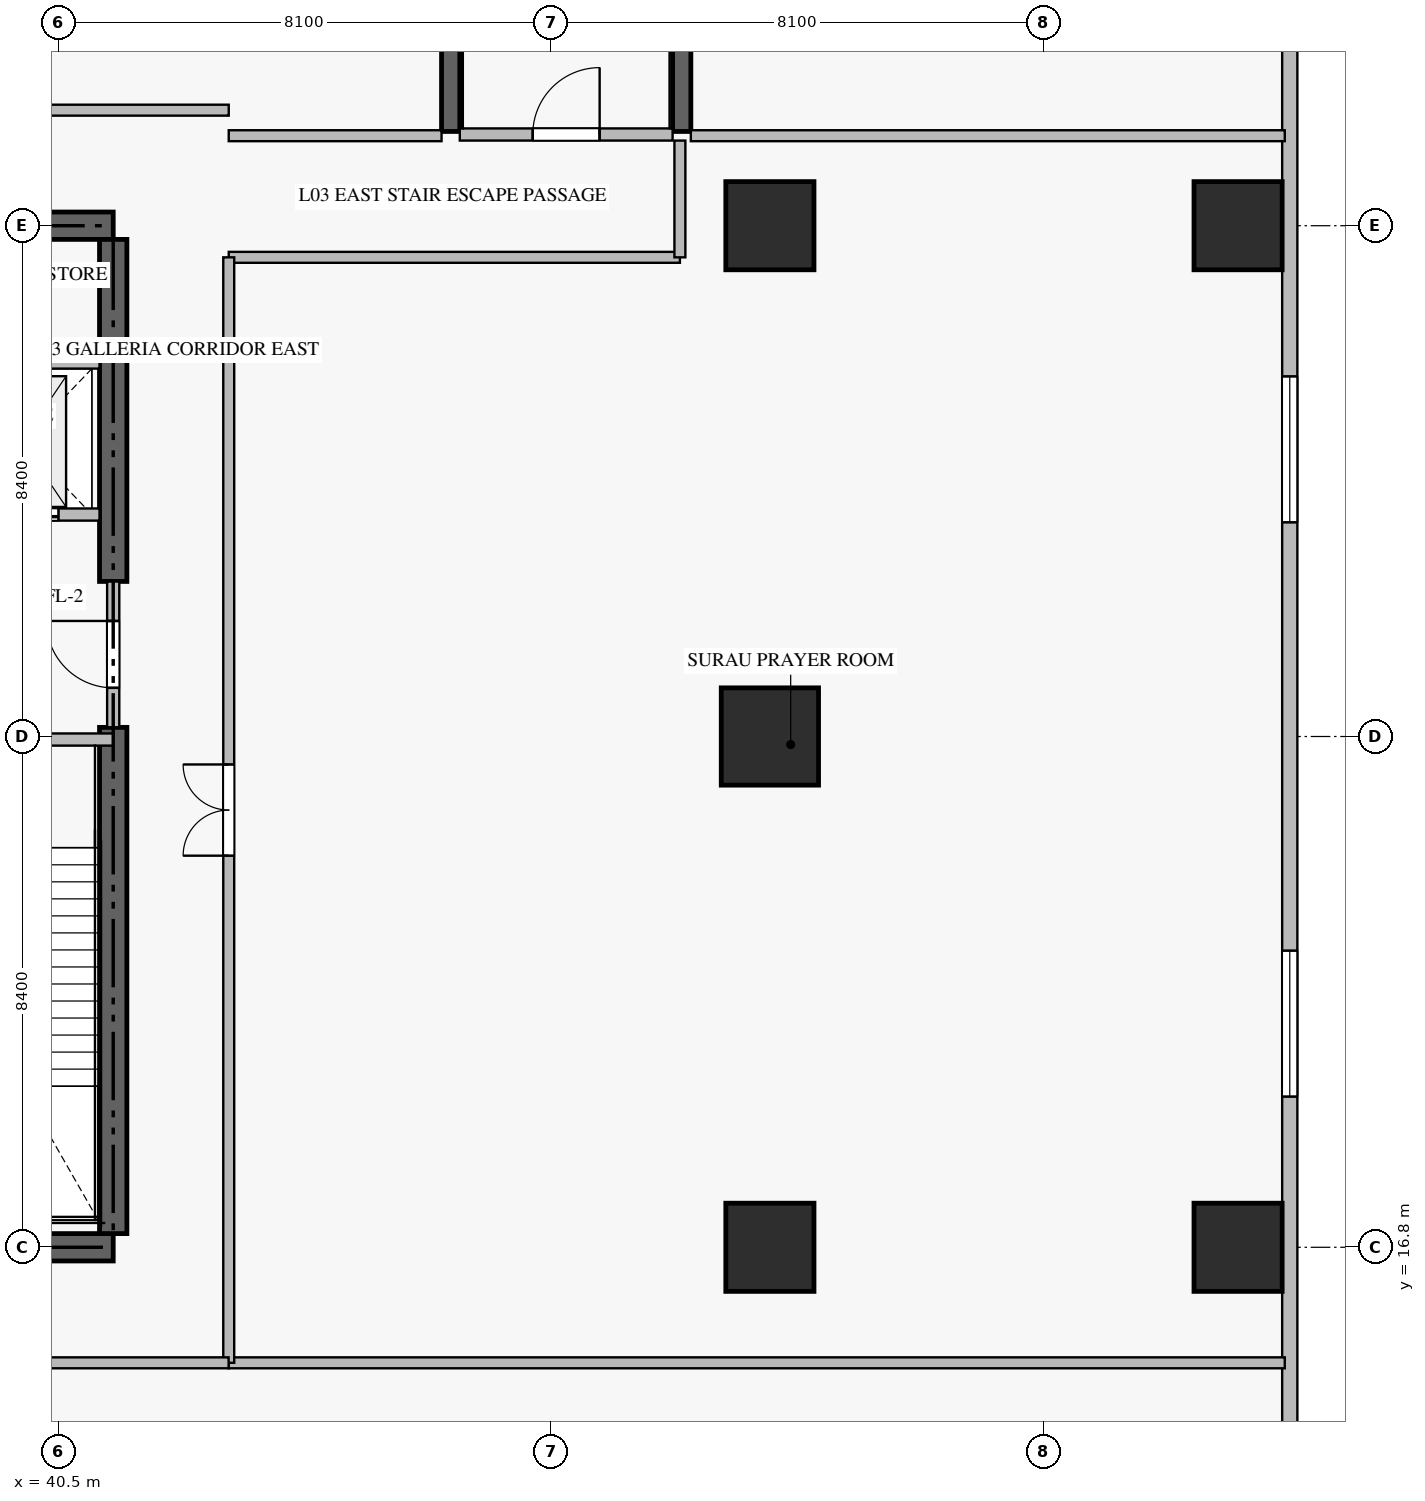
"""IFC4 building model, lengths in metres.
Left out: names, types, materials, properties, quantities, classifications, styles, units other than length and angle.
Written with IfcOpenShell. Run it as: python <this file> out.ifc"""

import sys

from ifc_helpers import new_model, si_unit, direction, frame, frame_2d, origin, origin_2d, place, context, subcontext, project, spatial, rectangle, extrude, source, transform, mapped, element, fill, save


model = new_model("IFC4")
c1 = context("Model", 3, precision=1e-05, world=origin(), true_north=direction((0.0, 1.0)))
c2 = subcontext(c1, "Body", "Model", "MODEL_VIEW")
j1 = project(units=[si_unit("LENGTHUNIT", "METRE"), si_unit("PLANEANGLEUNIT", "RADIAN")], contexts=[c1])
p1 = place(None, origin())
s1 = spatial("IfcSite", under=j1, at=p1, CompositionType="ELEMENT")
p2 = place(p1, origin())
s2 = spatial("IfcBuilding", under=s1, at=p2, CompositionType="ELEMENT")
p3 = place(p2, frame((0.0, 0.0, 15.3)))
s3 = spatial("IfcBuildingStorey", under=s2, at=p3, CompositionType="ELEMENT", Elevation=15.3)
for number, where, z_axis, x_axis in (
    (1, (23.4, 16.8, -0.38), (0.0, 0.0, 1.0), (1.0, 0.0, 0.0)),
    (2, (41.4, 33.6, -0.38), (0.0, 0.0, 1.0), (-1.0, 0.0, 0.0)),
):
    element("IfcWall", number, at=place(p3, frame(where, z_axis=z_axis, x_axis=x_axis)), inside=s3, PredefinedType="SHEAR", context=c2, shape_type="SweptSolid", body=[
        extrude(rectangle(XDim=18.0, YDim=0.45, at=frame_2d((9.0, 0.0))), origin(), (0.0, 0.0, 1.0), 5.228),
    ])
p4 = place(p3, frame((41.4, 17.025, -0.38), z_axis=(0.0, 0.0, 1.0), x_axis=(0.0, 1.0, 0.0)))
e3 = element("IfcWall", 3, at=p4, inside=s3, PredefinedType="SHEAR", context=c2, shape_type="SweptSolid", body=[
    extrude(rectangle(XDim=8.325, YDim=0.45, at=frame_2d((4.163, 0.0))), origin(), (0.0, 0.0, 1.0), 5.228),
])
p5 = place(p3, frame((41.4, 27.75, -0.38), z_axis=(0.0, 0.0, 1.0), x_axis=(0.0, 1.0, 0.0)))
e4 = element("IfcWall", 4, at=p5, inside=s3, PredefinedType="SHEAR", context=c2, shape_type="SweptSolid", body=[
    extrude(rectangle(XDim=5.625, YDim=0.45, at=frame_2d((2.812, 0.0))), origin(), (0.0, 0.0, 1.0), 5.228),
])
m1 = source(origin(), c2, "Body", "SweptSolid", [
    extrude(rectangle(XDim=1.45, YDim=1.45, at=origin_2d()), origin(), (0.0, 0.0, 1.0), 5.23),
])
p6 = place(p3, frame((52.2, 16.8, -0.38), z_axis=(0.0, 0.0, 1.0), x_axis=(1.0, 0.0, 0.0)))
e5 = element("IfcColumn", 5, at=p6, inside=s3, PredefinedType="COLUMN", context=c2, shape_type="MappedRepresentation", body=[
    mapped(m1, transform((0.0, 0.0, 0.0), scale=1.0)),
])
m2 = source(origin(), c2, "Body", "SweptSolid", [
    extrude(rectangle(XDim=1.6, YDim=1.6, at=origin_2d()), origin(), (0.0, 0.0, 1.0), 5.23),
])
p7 = place(p3, frame((52.2, 25.2, -0.38), z_axis=(0.0, 0.0, 1.0), x_axis=(1.0, 0.0, 0.0)))
e6 = element("IfcColumn", 6, at=p7, inside=s3, PredefinedType="COLUMN", context=c2, shape_type="MappedRepresentation", body=[
    mapped(m2, transform((0.0, 0.0, 0.0), scale=1.0)),
])
for number, where, z_axis, x_axis in (
    (7, (52.2, 33.6, -0.38), (0.0, 0.0, 1.0), (1.0, 0.0, 0.0)),
    (8, (59.9, 16.8, -0.38), (0.0, 0.0, 1.0), (1.0, 0.0, 0.0)),
    (9, (59.9, 33.6, -0.38), (0.0, 0.0, 1.0), (1.0, 0.0, 0.0)),
):
    element("IfcColumn", number, at=place(p3, frame(where, z_axis=z_axis, x_axis=x_axis)), inside=s3, PredefinedType="COLUMN", context=c2, shape_type="MappedRepresentation", body=[
        mapped(m1, transform((0.0, 0.0, 0.0), scale=1.0)),
    ])
p8 = place(p3, frame((60.75, 4.325, 0.0), z_axis=(0.0, 0.0, 1.0), x_axis=(0.0, 1.0, 0.0)))
e10 = element("IfcWall", 10, at=p8, inside=s3, PredefinedType="ELEMENTEDWALL", context=c2, shape_type="SweptSolid", body=[
    extrude(rectangle(XDim=41.75, YDim=0.25, at=frame_2d((20.875, 0.0))), origin(), (0.0, 0.0, 1.0), 4.835),
])
p9 = place(p8, frame((14.953, 0.0, 0.6)))
e11 = element("IfcOpeningElement", 11, at=p9, cuts=e10, PredefinedType="OPENING", context=c2, shape_type="SweptSolid", body=[
    extrude(rectangle(XDim=2.4, YDim=2.6, at=frame_2d((1.2, 1.3))), frame((0.0, 0.135, 0.0), z_axis=(0.0, -1.0, 0.0), x_axis=(1.0, 0.0, 0.0)), (0.0, 0.0, 1.0), 0.27),
])
p10 = place(p8, frame((24.397, 0.0, 0.6)))
e12 = element("IfcOpeningElement", 12, at=p10, cuts=e10, PredefinedType="OPENING", context=c2, shape_type="SweptSolid", body=[
    extrude(rectangle(XDim=2.4, YDim=2.6, at=frame_2d((1.2, 1.3))), frame((0.0, 0.135, 0.0), z_axis=(0.0, -1.0, 0.0), x_axis=(1.0, 0.0, 0.0)), (0.0, 0.0, 1.0), 0.27),
])
p11 = place(p3, frame((36.95, 25.15, 0.0), z_axis=(0.0, 0.0, 1.0), x_axis=(1.0, 0.0, 0.0)))
e13 = element("IfcWall", 13, at=p11, inside=s3, PredefinedType="STANDARD", context=c2, shape_type="SweptSolid", body=[
    extrude(rectangle(XDim=4.45, YDim=0.2, at=frame_2d((2.225, 0.0))), origin(), (0.0, 0.0, 1.0), 4.85),
])
p12 = place(p11, frame((1.65, 0.0, 0.0)))
e14 = element("IfcOpeningElement", 14, at=p12, cuts=e13, PredefinedType="OPENING", context=c2, shape_type="SweptSolid", body=[
    extrude(rectangle(XDim=1.1, YDim=2.15, at=frame_2d((0.55, 1.075))), frame((0.0, 0.11, 0.0), z_axis=(0.0, -1.0, 0.0), x_axis=(1.0, 0.0, 0.0)), (0.0, 0.0, 1.0), 0.22),
])
for number, where, z_axis, x_axis in (
    (15, (46.95, 35.15, -0.38), (0.0, 0.0, 1.0), (0.0, 1.0, 0.0)),
    (16, (50.75, 35.15, -0.38), (0.0, 0.0, 1.0), (0.0, 1.0, 0.0)),
):
    element("IfcWall", number, at=place(p3, frame(where, z_axis=z_axis, x_axis=x_axis)), inside=s3, PredefinedType="SHEAR", context=c2, shape_type="SweptSolid", body=[
        extrude(rectangle(XDim=7.9, YDim=0.3, at=frame_2d((3.95, 0.0))), origin(), (0.0, 0.0, 1.0), 5.228),
    ])
p13 = place(p3, frame((47.1, 35.1, 0.0), z_axis=(0.0, 0.0, 1.0), x_axis=(1.0, 0.0, 0.0)))
e17 = element("IfcWall", 17, at=p13, inside=s3, PredefinedType="STANDARD", context=c2, shape_type="SweptSolid", body=[
    extrude(rectangle(XDim=3.5, YDim=0.2, at=frame_2d((1.75, 0.0))), origin(), (0.0, 0.0, 1.0), 4.85),
])
p14 = place(p13, frame((1.2, 0.0, 0.0)))
e18 = element("IfcOpeningElement", 18, at=p14, cuts=e17, PredefinedType="OPENING", context=c2, shape_type="SweptSolid", body=[
    extrude(rectangle(XDim=1.1, YDim=2.15, at=frame_2d((0.55, 1.075))), frame((0.0, 0.11, 0.0), z_axis=(0.0, -1.0, 0.0), x_axis=(1.0, 0.0, 0.0)), (0.0, 0.0, 1.0), 0.22),
])
p15 = place(p3, frame((38.75, 28.85, 0.0), z_axis=(0.0, 0.0, 1.0), x_axis=(1.0, 0.0, 0.0)))
e19 = element("IfcWall", 19, at=p15, inside=s3, PredefinedType="STANDARD", context=c2, shape_type="SweptSolid", body=[
    extrude(rectangle(XDim=2.425, YDim=0.2, at=frame_2d((1.212, 0.0))), origin(), (0.0, 0.0, 1.0), 4.85),
])
p16 = place(p15, frame((0.55, 0.0, 0.0)))
e20 = element("IfcOpeningElement", 20, at=p16, cuts=e19, PredefinedType="OPENING", context=c2, shape_type="SweptSolid", body=[
    extrude(rectangle(XDim=1.2, YDim=2.2, at=frame_2d((0.6, 1.1))), frame((0.0, 0.11, 0.0), z_axis=(0.0, -1.0, 0.0), x_axis=(1.0, 0.0, 0.0)), (0.0, 0.0, 1.0), 0.22),
])
p17 = place(p3, frame((38.75, 31.35, 0.0), z_axis=(0.0, 0.0, 1.0), x_axis=(1.0, 0.0, 0.0)))
e21 = element("IfcWall", 21, at=p17, inside=s3, PredefinedType="STANDARD", context=c2, shape_type="SweptSolid", body=[
    extrude(rectangle(XDim=2.425, YDim=0.2, at=frame_2d((1.212, 0.0))), origin(), (0.0, 0.0, 1.0), 4.85),
])
p18 = place(p3, frame((41.4, 25.352, 0.0), z_axis=(0.0, 0.0, 1.0), x_axis=(0.0, 1.0, 0.0)))
e22 = element("IfcWall", 22, at=p18, inside=s3, PredefinedType="STANDARD", context=c2, shape_type="SweptSolid", body=[
    extrude(rectangle(XDim=2.396, YDim=0.2, at=frame_2d((1.198, 0.0))), origin(), (0.0, 0.0, 1.0), 4.85),
])
p19 = place(p18, frame((0.648, 0.0, 0.0)))
e23 = element("IfcOpeningElement", 23, at=p19, cuts=e22, PredefinedType="OPENING", context=c2, shape_type="SweptSolid", body=[
    extrude(rectangle(XDim=1.1, YDim=2.15, at=frame_2d((0.55, 1.075))), frame((0.0, 0.11, 0.0), z_axis=(0.0, -1.0, 0.0), x_axis=(1.0, 0.0, 0.0)), (0.0, 0.0, 1.0), 0.22),
])
p20 = place(p3, frame((43.3, 14.9, 0.0), z_axis=(0.0, 0.0, 1.0), x_axis=(1.0, 0.0, 0.0)))
e24 = element("IfcWall", 24, at=p20, inside=s3, PredefinedType="PARTITIONING", context=c2, shape_type="SweptSolid", body=[
    extrude(rectangle(XDim=17.368, YDim=0.18, at=frame_2d((8.684, 0.0))), origin(), (0.0, 0.0, 1.0), 4.85),
])
p21 = place(p3, frame((43.3, 35.08, 0.0), z_axis=(0.0, 0.0, 1.0), x_axis=(1.0, 0.0, 0.0)))
e25 = element("IfcWall", 25, at=p21, inside=s3, PredefinedType="PARTITIONING", context=c2, shape_type="SweptSolid", body=[
    extrude(rectangle(XDim=3.5, YDim=0.18, at=frame_2d((1.75, 0.0))), origin(), (0.0, 0.0, 1.0), 4.85),
])
p22 = place(p3, frame((43.3, 33.08, 0.0), z_axis=(0.0, 0.0, 1.0), x_axis=(1.0, 0.0, 0.0)))
e26 = element("IfcWall", 26, at=p22, inside=s3, PredefinedType="PARTITIONING", context=c2, shape_type="SweptSolid", body=[
    extrude(rectangle(XDim=7.42, YDim=0.18, at=frame_2d((3.71, 0.0))), origin(), (0.0, 0.0, 1.0), 4.85),
])
p23 = place(p3, frame((50.9, 35.08, 0.0), z_axis=(0.0, 0.0, 1.0), x_axis=(1.0, 0.0, 0.0)))
e27 = element("IfcWall", 27, at=p23, inside=s3, PredefinedType="PARTITIONING", context=c2, shape_type="SweptSolid", body=[
    extrude(rectangle(XDim=9.768, YDim=0.18, at=frame_2d((4.884, 0.0))), origin(), (0.0, 0.0, 1.0), 4.85),
])
p24 = place(p3, frame((50.72, 33.08, 0.0), z_axis=(0.0, 0.0, 1.0), x_axis=(0.0, 1.0, 0.0)))
e28 = element("IfcWall", 28, at=p24, inside=s3, PredefinedType="PARTITIONING", context=c2, shape_type="SweptSolid", body=[
    extrude(rectangle(XDim=1.92, YDim=0.18, at=frame_2d((0.96, 0.0))), origin(), (0.0, 0.0, 1.0), 4.85),
])
p25 = place(p3, frame((43.3, 14.9, 0.0), z_axis=(0.0, 0.0, 1.0), x_axis=(0.0, 1.0, 0.0)))
e29 = element("IfcWall", 29, at=p25, inside=s3, PredefinedType="PARTITIONING", context=c2, shape_type="SweptSolid", body=[
    extrude(rectangle(XDim=18.18, YDim=0.18, at=frame_2d((9.09, 0.0))), origin(), (0.0, 0.0, 1.0), 4.85),
])
p26 = place(p25, frame((8.34, 0.0, 0.0)))
e30 = element("IfcOpeningElement", 30, at=p26, cuts=e29, PredefinedType="OPENING", context=c2, shape_type="SweptSolid", body=[
    extrude(rectangle(XDim=1.5, YDim=2.25, at=frame_2d((0.75, 1.125))), frame((0.0, 0.1, 0.0), z_axis=(0.0, -1.0, 0.0), x_axis=(1.0, 0.0, 0.0)), (0.0, 0.0, 1.0), 0.2),
])
p27 = place(p3, frame((35.202, 14.9, 0.0), z_axis=(0.0, 0.0, 1.0), x_axis=(1.0, 0.0, 0.0)))
e31 = element("IfcWall", 31, at=p27, inside=s3, PredefinedType="PARTITIONING", context=c2, shape_type="SweptSolid", body=[
    extrude(rectangle(XDim=8.096, YDim=0.18, at=frame_2d((4.048, 0.0))), origin(), (0.0, 0.0, 1.0), 4.85),
])
p28 = place(p27, frame((3.298, 0.0, 0.0)))
e32 = element("IfcOpeningElement", 32, at=p28, cuts=e31, PredefinedType="OPENING", context=c2, shape_type="SweptSolid", body=[
    extrude(rectangle(XDim=1.5, YDim=2.25, at=frame_2d((0.75, 1.125))), frame((0.0, 0.1, 0.0), z_axis=(0.0, -1.0, 0.0), x_axis=(1.0, 0.0, 0.0)), (0.0, 0.0, 1.0), 0.2),
])
p29 = place(p3, frame((35.952, 35.5, 0.0), z_axis=(0.0, 0.0, 1.0), x_axis=(1.0, 0.0, 0.0)))
e33 = element("IfcWall", 33, at=p29, inside=s3, PredefinedType="PARTITIONING", context=c2, shape_type="SweptSolid", body=[
    extrude(rectangle(XDim=7.348, YDim=0.18, at=frame_2d((3.674, 0.0))), origin(), (0.0, 0.0, 1.0), 4.85),
])
p30 = place(p29, frame((2.974, 0.0, 0.0)))
e34 = element("IfcOpeningElement", 34, at=p30, cuts=e33, PredefinedType="OPENING", context=c2, shape_type="SweptSolid", body=[
    extrude(rectangle(XDim=1.4, YDim=2.25, at=frame_2d((0.7, 1.125))), frame((0.0, 0.1, 0.0), z_axis=(0.0, -1.0, 0.0), x_axis=(1.0, 0.0, 0.0)), (0.0, 0.0, 1.0), 0.2),
])
m3 = source(origin(), c2, "Body", "SweptSolid", [
    extrude(rectangle(XDim=2.4, YDim=2.6, at=frame_2d((1.2, 1.3))), frame((0.0, 0.03, 0.0), z_axis=(0.0, -1.0, 0.0), x_axis=(1.0, 0.0, 0.0)), (0.0, 0.0, 1.0), 0.06),
])
p31 = place(p9, origin())
e35 = element("IfcWindow", 35, at=p31, inside=s3, PartitioningType="SINGLE_PANEL", PredefinedType="WINDOW", context=c2, shape_type="MappedRepresentation", body=[
    mapped(m3, transform((0.0, 0.0, 0.0), scale=1.0)),
])
fill(e11, e35)
p32 = place(p10, origin())
e36 = element("IfcWindow", 36, at=p32, inside=s3, PartitioningType="SINGLE_PANEL", PredefinedType="WINDOW", context=c2, shape_type="MappedRepresentation", body=[
    mapped(m3, transform((0.0, 0.0, 0.0), scale=1.0)),
])
fill(e12, e36)
m4 = source(origin(), c2, "Body", "SweptSolid", [
    extrude(rectangle(XDim=1.1, YDim=2.15, at=frame_2d((0.55, 1.075))), frame((0.0, 0.025, 0.0), z_axis=(0.0, -1.0, 0.0), x_axis=(1.0, 0.0, 0.0)), (0.0, 0.0, 1.0), 0.05),
])
p33 = place(p14, origin())
e37 = element("IfcDoor", 37, at=p33, inside=s3, OperationType="SINGLE_SWING_RIGHT", PredefinedType="DOOR", context=c2, shape_type="MappedRepresentation", body=[
    mapped(m4, transform((0.0, 0.0, 0.0), scale=1.0)),
])
fill(e18, e37)
m5 = source(origin(), c2, "Body", "SweptSolid", [
    extrude(rectangle(XDim=1.2, YDim=2.2, at=frame_2d((0.6, 1.1))), frame((0.0, 0.025, 0.0), z_axis=(0.0, -1.0, 0.0), x_axis=(1.0, 0.0, 0.0)), (0.0, 0.0, 1.0), 0.05),
])
p34 = place(p16, origin())
e38 = element("IfcDoor", 38, at=p34, inside=s3, OperationType="DOUBLE_DOOR_SLIDING", PredefinedType="DOOR", context=c2, shape_type="MappedRepresentation", body=[
    mapped(m5, transform((0.0, 0.0, 0.0), scale=1.0)),
])
fill(e20, e38)
p35 = place(p19, origin())
e39 = element("IfcDoor", 39, at=p35, inside=s3, OperationType="SINGLE_SWING_RIGHT", PredefinedType="DOOR", context=c2, shape_type="MappedRepresentation", body=[
    mapped(m4, transform((0.0, 0.0, 0.0), scale=1.0)),
])
fill(e23, e39)
m6 = source(origin(), c2, "Body", "SweptSolid", [
    extrude(rectangle(XDim=1.5, YDim=2.25, at=frame_2d((0.75, 1.125))), frame((0.0, 0.025, 0.0), z_axis=(0.0, -1.0, 0.0), x_axis=(1.0, 0.0, 0.0)), (0.0, 0.0, 1.0), 0.05),
])
p36 = place(p26, origin())
e40 = element("IfcDoor", 40, at=p36, inside=s3, OperationType="DOUBLE_DOOR_SINGLE_SWING", PredefinedType="DOOR", context=c2, shape_type="MappedRepresentation", body=[
    mapped(m6, transform((0.0, 0.0, 0.0), scale=1.0)),
])
fill(e30, e40)
save(model, sys.argv[1])
